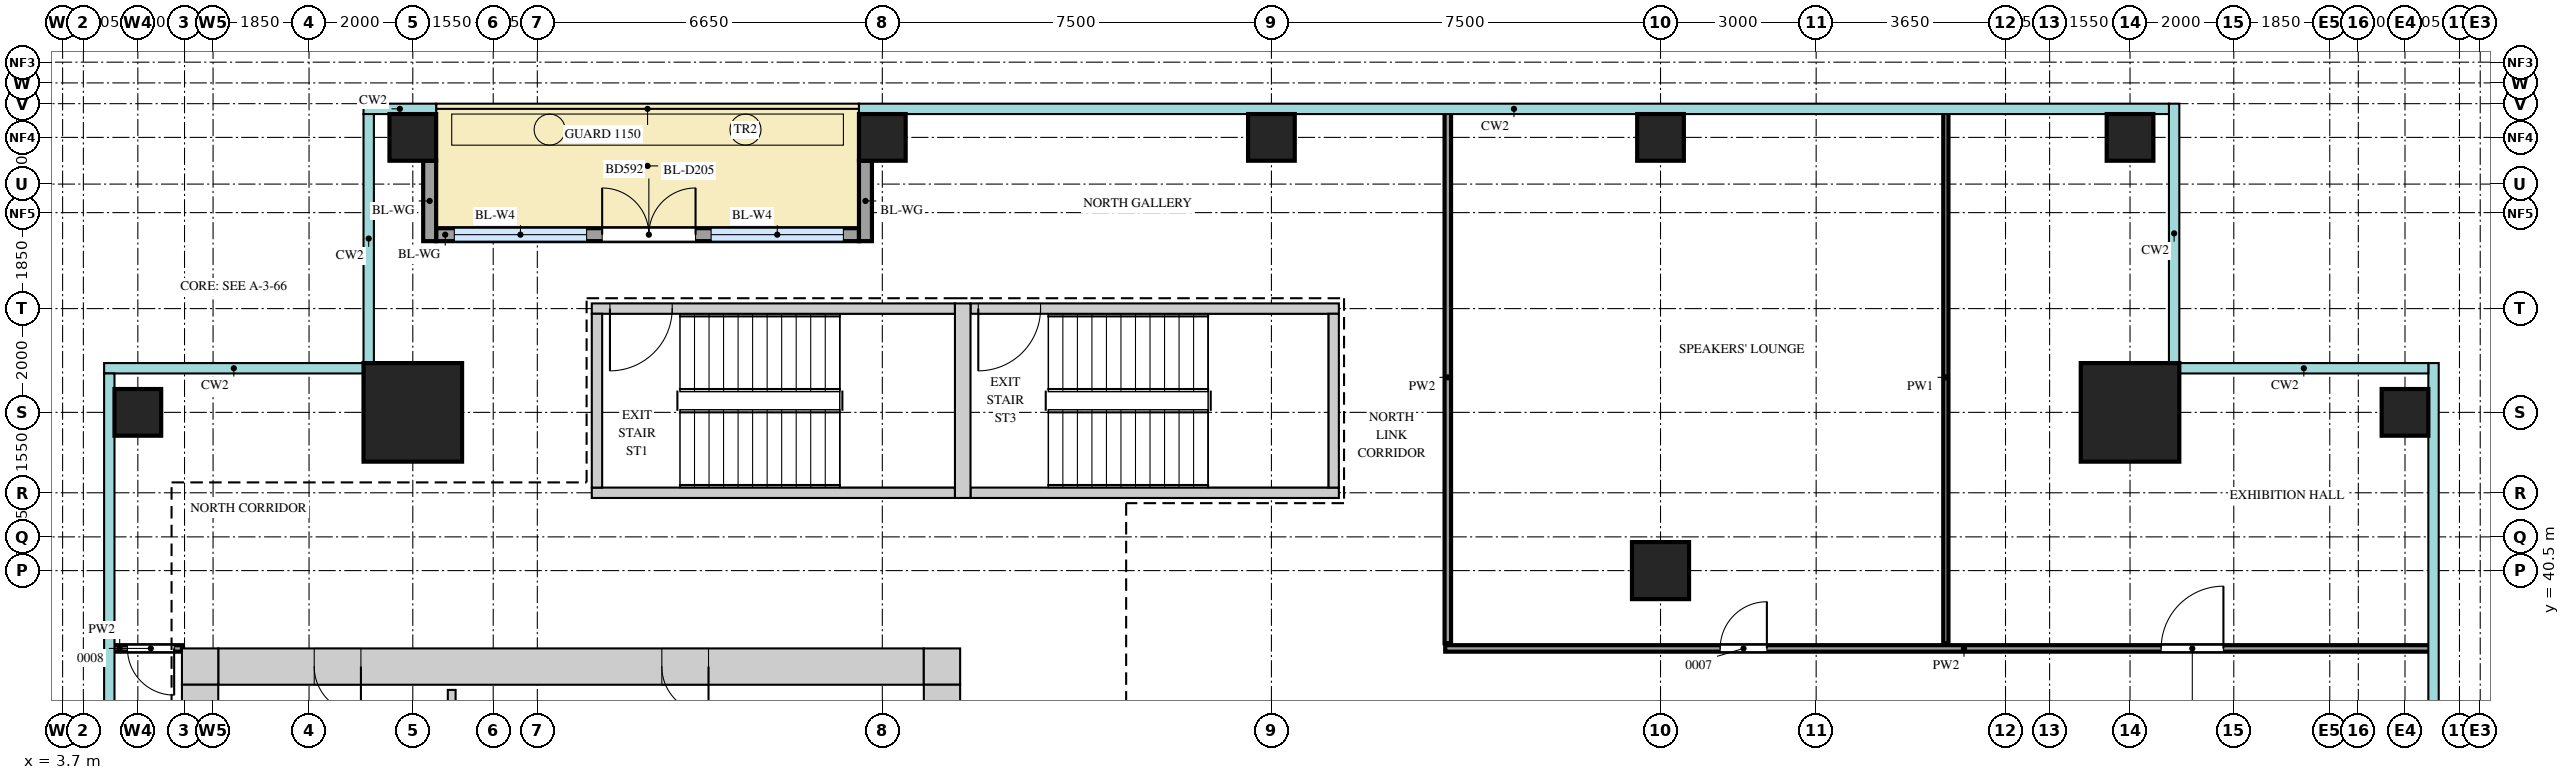
"""IFC4 building model, lengths in metres.
Left out: names, types, materials, properties, quantities, classifications, styles, units other than length and angle.
Written with IfcOpenShell. Run it as: python <this file> out.ifc"""

import sys

from ifc_helpers import new_model, si_unit, direction, frame, frame_2d, origin, origin_2d, place, context, subcontext, project, spatial, rectangle, extrude, source, transform, mapped, element, fill, save


model = new_model("IFC4")
c1 = context("Model", 3, precision=1e-05, world=origin(), true_north=direction((0.0, 1.0)))
c2 = subcontext(c1, "Body", "Model", "MODEL_VIEW")
j1 = project(units=[si_unit("LENGTHUNIT", "METRE"), si_unit("PLANEANGLEUNIT", "RADIAN")], contexts=[c1])
p1 = place(None, origin())
s1 = spatial("IfcSite", under=j1, at=p1, CompositionType="ELEMENT")
p2 = place(p1, origin())
s2 = spatial("IfcBuilding", under=s1, at=p2, CompositionType="ELEMENT")
p3 = place(p2, frame((0.0, 0.0, 262.2)))
s3 = spatial("IfcBuildingStorey", under=s2, at=p3, CompositionType="ELEMENT", Elevation=262.2)
m1 = source(origin(), c2, "Body", "SweptSolid", [
    extrude(rectangle(XDim=13.6, YDim=0.7, at=frame_2d((6.8, 0.0))), origin(), (0.0, 0.0, 1.0), 3.75),
])
p4 = place(p3, frame((6.7, 38.65, 0.0), z_axis=(0.0, 0.0, 1.0), x_axis=(1.0, 0.0, 0.0)))
e1 = element("IfcWall", 1, at=p4, inside=s3, PredefinedType="SHEAR", context=c2, shape_type="MappedRepresentation", body=[
    mapped(m1, transform((0.0, 0.0, 0.0))),
])
m2 = source(origin(), c2, "Body", "SweptSolid", [
    extrude(rectangle(XDim=0.9, YDim=2.1, at=frame_2d((0.45, 1.05))), frame((0.0, 0.36, 0.0), z_axis=(0.0, -1.0, 0.0), x_axis=(1.0, 0.0, 0.0)), (0.0, 0.0, 1.0), 0.72),
])
p5 = place(p4, frame((1.85, 0.0, 0.0)))
e2 = element("IfcOpeningElement", 2, at=p5, cuts=e1, PredefinedType="OPENING", context=c2, shape_type="MappedRepresentation", body=[
    mapped(m2, transform((0.0, 0.0, 0.0))),
])
p6 = place(p4, frame((8.55, 0.0, 0.0)))
e3 = element("IfcOpeningElement", 3, at=p6, cuts=e1, PredefinedType="OPENING", context=c2, shape_type="MappedRepresentation", body=[
    mapped(m2, transform((0.0, 0.0, 0.0))),
])
m3 = source(origin(), c2, "Body", "SweptSolid", [
    extrude(rectangle(XDim=0.7, YDim=0.7, at=frame_2d((0.35, 0.0))), origin(), (0.0, 0.0, 1.0), 3.75),
])
for number, where, z_axis, x_axis in (
    (4, (20.3, 38.65, 0.0), (0.0, 0.0, 1.0), (1.0, 0.0, 0.0)),
    (5, (6.0, 38.65, 0.0), (0.0, 0.0, 1.0), (1.0, 0.0, 0.0)),
):
    element("IfcWall", number, at=place(p3, frame(where, z_axis=z_axis, x_axis=x_axis)), inside=s3, PredefinedType="SHEAR", context=c2, shape_type="MappedRepresentation", body=[
        mapped(m3, transform((0.0, 0.0, 0.0))),
    ])
m4 = source(origin(), c2, "Body", "SweptSolid", [
    extrude(rectangle(XDim=22.6, YDim=0.7, at=frame_2d((11.3, 0.0))), origin(), (0.0, 0.0, 1.0), 3.75),
])
p7 = place(p3, frame((20.65, 15.7, 0.0), z_axis=(0.0, 0.0, 1.0), x_axis=(0.0, 1.0, 0.0)))
e6 = element("IfcWall", 6, at=p7, inside=s3, PredefinedType="SHEAR", context=c2, shape_type="MappedRepresentation", body=[
    mapped(m4, transform((0.0, 0.0, 0.0))),
])
m5 = source(origin(), c2, "Body", "SweptSolid", [
    extrude(rectangle(XDim=1.8, YDim=2.1, at=frame_2d((0.9, 1.05))), frame((0.0, 0.36, 0.0), z_axis=(0.0, -1.0, 0.0), x_axis=(1.0, 0.0, 0.0)), (0.0, 0.0, 1.0), 0.72),
])
p8 = place(p7, frame((10.8, 0.0, 0.0)))
e7 = element("IfcOpeningElement", 7, at=p8, cuts=e6, PredefinedType="OPENING", context=c2, shape_type="MappedRepresentation", body=[
    mapped(m5, transform((0.0, 0.0, 0.0))),
])
p9 = place(p7, frame((0.45, 0.0, 0.0)))
e8 = element("IfcOpeningElement", 8, at=p9, cuts=e6, PredefinedType="OPENING", context=c2, shape_type="MappedRepresentation", body=[
    mapped(m2, transform((0.0, 0.0, 0.0))),
])
p10 = place(p7, frame((2.25, 0.0, 0.0)))
e9 = element("IfcOpeningElement", 9, at=p10, cuts=e6, PredefinedType="OPENING", context=c2, shape_type="MappedRepresentation", body=[
    mapped(m2, transform((0.0, 0.0, 0.0))),
])
m6 = source(origin(), c2, "Body", "SweptSolid", [
    extrude(rectangle(XDim=1.0, YDim=2.1, at=frame_2d((0.5, 1.05))), frame((0.0, 0.36, 0.0), z_axis=(0.0, -1.0, 0.0), x_axis=(1.0, 0.0, 0.0)), (0.0, 0.0, 1.0), 0.72),
])
p11 = place(p7, frame((4.95, 0.0, 0.0)))
e10 = element("IfcOpeningElement", 10, at=p11, cuts=e6, PredefinedType="OPENING", context=c2, shape_type="MappedRepresentation", body=[
    mapped(m6, transform((0.0, 0.0, 0.0))),
])
p12 = place(p3, frame((6.35, 15.7, 0.0), z_axis=(0.0, 0.0, 1.0), x_axis=(0.0, 1.0, 0.0)))
e11 = element("IfcWall", 11, at=p12, inside=s3, PredefinedType="SHEAR", context=c2, shape_type="MappedRepresentation", body=[
    mapped(m4, transform((0.0, 0.0, 0.0))),
])
m7 = source(origin(), c2, "Body", "SweptSolid", [
    extrude(rectangle(XDim=7.0, YDim=0.2, at=frame_2d((3.5, 0.0))), origin(), (0.0, 0.0, 1.0), 3.75),
])
p13 = place(p3, frame((13.9, 45.55, 0.0), z_axis=(0.0, 0.0, 1.0), x_axis=(1.0, 0.0, 0.0)))
e12 = element("IfcWall", 12, at=p13, inside=s3, PredefinedType="SHEAR", context=c2, shape_type="MappedRepresentation", body=[
    mapped(m7, transform((0.0, 0.0, 0.0))),
])
m8 = source(origin(), c2, "Body", "SweptSolid", [
    extrude(rectangle(XDim=1.2, YDim=2.1, at=frame_2d((0.6, 1.05))), frame((0.0, 0.11, 0.0), z_axis=(0.0, -1.0, 0.0), x_axis=(1.0, 0.0, 0.0)), (0.0, 0.0, 1.0), 0.22),
])
p14 = place(p13, frame((0.35, 0.0, 0.0)))
e13 = element("IfcOpeningElement", 13, at=p14, cuts=e12, PredefinedType="OPENING", context=c2, shape_type="MappedRepresentation", body=[
    mapped(m8, transform((0.0, 0.0, 0.0))),
])
p15 = place(p3, frame((13.9, 42.0, 0.0), z_axis=(0.0, 0.0, 1.0), x_axis=(1.0, 0.0, 0.0)))
e14 = element("IfcWall", 14, at=p15, inside=s3, PredefinedType="SHEAR", context=c2, shape_type="MappedRepresentation", body=[
    mapped(m7, transform((0.0, 0.0, 0.0))),
])
m9 = source(origin(), c2, "Body", "SweptSolid", [
    extrude(rectangle(XDim=7.1, YDim=0.2, at=frame_2d((3.55, 0.0))), origin(), (0.0, 0.0, 1.0), 3.75),
])
p16 = place(p3, frame((21.2, 45.55, 0.0), z_axis=(0.0, 0.0, 1.0), x_axis=(1.0, 0.0, 0.0)))
e15 = element("IfcWall", 15, at=p16, inside=s3, PredefinedType="SHEAR", context=c2, shape_type="MappedRepresentation", body=[
    mapped(m9, transform((0.0, 0.0, 0.0))),
])
p17 = place(p16, frame((0.15, 0.0, 0.0)))
e16 = element("IfcOpeningElement", 16, at=p17, cuts=e15, PredefinedType="OPENING", context=c2, shape_type="MappedRepresentation", body=[
    mapped(m8, transform((0.0, 0.0, 0.0))),
])
p18 = place(p3, frame((21.2, 42.0, 0.0), z_axis=(0.0, 0.0, 1.0), x_axis=(1.0, 0.0, 0.0)))
e17 = element("IfcWall", 17, at=p18, inside=s3, PredefinedType="SHEAR", context=c2, shape_type="MappedRepresentation", body=[
    mapped(m9, transform((0.0, 0.0, 0.0))),
])
m10 = source(origin(), c2, "Body", "SweptSolid", [
    extrude(rectangle(XDim=3.75, YDim=0.3, at=frame_2d((1.875, 0.0))), origin(), (0.0, 0.0, 1.0), 3.75),
])
p19 = place(p3, frame((21.05, 41.9, 0.0), z_axis=(0.0, 0.0, 1.0), x_axis=(0.0, 1.0, 0.0)))
e18 = element("IfcWall", 18, at=p19, inside=s3, PredefinedType="SHEAR", context=c2, shape_type="MappedRepresentation", body=[
    mapped(m10, transform((0.0, 0.0, 0.0))),
])
m11 = source(origin(), c2, "Body", "SweptSolid", [
    extrude(rectangle(XDim=3.35, YDim=0.2, at=frame_2d((1.675, 0.0))), origin(), (0.0, 0.0, 1.0), 3.75),
])
for number, where, z_axis, x_axis in (
    (19, (14.0, 42.1, 0.0), (0.0, 0.0, 1.0), (0.0, 1.0, 0.0)),
    (20, (28.2, 42.1, 0.0), (0.0, 0.0, 1.0), (0.0, 1.0, 0.0)),
):
    element("IfcWall", number, at=place(p3, frame(where, z_axis=z_axis, x_axis=x_axis)), inside=s3, PredefinedType="SHEAR", context=c2, shape_type="MappedRepresentation", body=[
        mapped(m11, transform((0.0, 0.0, 0.0))),
    ])
m12 = source(origin(), c2, "Body", "SweptSolid", [
    extrude(rectangle(XDim=1.9, YDim=1.9, at=origin_2d()), origin(), (0.0, 0.0, 1.0), 4.0),
])
for number, where, z_axis, x_axis in (
    (21, (43.55, 43.55, 0.0), (0.0, 0.0, 1.0), (1.0, 0.0, 0.0)),
    (22, (10.45, 43.55, 0.0), (0.0, 0.0, 1.0), (1.0, 0.0, 0.0)),
):
    element("IfcColumn", number, at=place(p3, frame(where, z_axis=z_axis, x_axis=x_axis)), inside=s3, PredefinedType="COLUMN", context=c2, shape_type="MappedRepresentation", body=[
        mapped(m12, transform((0.0, 0.0, 0.0))),
    ])
m13 = source(origin(), c2, "Body", "SweptSolid", [
    extrude(rectangle(XDim=0.9, YDim=0.9, at=origin_2d()), origin(), (0.0, 0.0, 1.0), 3.75),
])
for number, where, z_axis, x_axis in (
    (23, (48.85, 43.55, 0.0), (0.0, 0.0, 1.0), (1.0, 0.0, 0.0)),
    (24, (10.45, 48.85, 0.0), (0.0, 0.0, 1.0), (1.0, 0.0, 0.0)),
    (25, (19.5, 48.85, 0.0), (0.0, 0.0, 1.0), (1.0, 0.0, 0.0)),
    (26, (27.0, 48.85, 0.0), (0.0, 0.0, 1.0), (1.0, 0.0, 0.0)),
    (27, (34.5, 48.85, 0.0), (0.0, 0.0, 1.0), (1.0, 0.0, 0.0)),
    (28, (43.55, 48.85, 0.0), (0.0, 0.0, 1.0), (1.0, 0.0, 0.0)),
    (29, (5.15, 43.55, 0.0), (0.0, 0.0, 1.0), (1.0, 0.0, 0.0)),
):
    element("IfcColumn", number, at=place(p3, frame(where, z_axis=z_axis, x_axis=x_axis)), inside=s3, PredefinedType="COLUMN", context=c2, shape_type="MappedRepresentation", body=[
        mapped(m13, transform((0.0, 0.0, 0.0))),
    ])
m14 = source(origin(), c2, "Body", "SweptSolid", [
    extrude(rectangle(XDim=1.1, YDim=1.1, at=origin_2d()), origin(), (0.0, 0.0, 1.0), 3.75),
])
p20 = place(p3, frame((34.5, 40.5, 0.0), z_axis=(0.0, 0.0, 1.0), x_axis=(1.0, 0.0, 0.0)))
e30 = element("IfcColumn", 30, at=p20, inside=s3, PredefinedType="COLUMN", context=c2, shape_type="MappedRepresentation", body=[
    mapped(m14, transform((0.0, 0.0, 0.0))),
])
m15 = source(origin(), c2, "Body", "SweptSolid", [
    extrude(rectangle(XDim=8.15, YDim=0.25, at=frame_2d((4.075, 0.0))), origin(), (0.0, 0.0, 1.0), 3.35),
])
p21 = place(p3, frame((10.9, 46.975, 0.0), z_axis=(0.0, 0.0, 1.0), x_axis=(1.0, 0.0, 0.0)))
e31 = element("IfcWall", 31, at=p21, inside=s3, PredefinedType="SOLIDWALL", context=c2, shape_type="MappedRepresentation", body=[
    mapped(m15, transform((0.0, 0.0, 0.0))),
])
m16 = source(origin(), c2, "Body", "SweptSolid", [
    extrude(rectangle(XDim=2.55, YDim=2.4, at=frame_2d((1.275, 1.2))), frame((0.0, 0.135, 0.0), z_axis=(0.0, -1.0, 0.0), x_axis=(1.0, 0.0, 0.0)), (0.0, 0.0, 1.0), 0.27),
])
p22 = place(p21, frame((0.35, 0.0, 0.0)))
e32 = element("IfcOpeningElement", 32, at=p22, cuts=e31, PredefinedType="OPENING", context=c2, shape_type="MappedRepresentation", body=[
    mapped(m16, transform((0.0, 0.0, 0.0))),
])
p23 = place(p21, frame((5.3, 0.0, 0.0)))
e33 = element("IfcOpeningElement", 33, at=p23, cuts=e31, PredefinedType="OPENING", context=c2, shape_type="MappedRepresentation", body=[
    mapped(m16, transform((0.0, 0.0, 0.0))),
])
m17 = source(origin(), c2, "Body", "SweptSolid", [
    extrude(rectangle(XDim=1.8, YDim=2.4, at=frame_2d((0.9, 1.2))), frame((0.0, 0.135, 0.0), z_axis=(0.0, -1.0, 0.0), x_axis=(1.0, 0.0, 0.0)), (0.0, 0.0, 1.0), 0.27),
])
p24 = place(p21, frame((3.2, 0.0, 0.0)))
e34 = element("IfcOpeningElement", 34, at=p24, cuts=e31, PredefinedType="OPENING", context=c2, shape_type="MappedRepresentation", body=[
    mapped(m17, transform((0.0, 0.0, 0.0))),
])
m18 = source(origin(), c2, "Body", "SweptSolid", [
    extrude(rectangle(XDim=1.55, YDim=0.25, at=frame_2d((0.775, 0.0))), origin(), (0.0, 0.0, 1.0), 3.35),
])
for number, where, z_axis, x_axis in (
    (35, (10.775, 48.4, 0.0), (0.0, 0.0, 1.0), (0.0, -1.0, 0.0)),
    (36, (19.175, 48.4, 0.0), (0.0, 0.0, 1.0), (0.0, -1.0, 0.0)),
):
    element("IfcWall", number, at=place(p3, frame(where, z_axis=z_axis, x_axis=x_axis)), inside=s3, PredefinedType="SOLIDWALL", context=c2, shape_type="MappedRepresentation", body=[
        mapped(m18, transform((0.0, 0.0, 0.0))),
    ])
m19 = source(origin(), c2, "Body", "SweptSolid", [
    extrude(rectangle(XDim=6.0, YDim=0.15, at=frame_2d((3.0, 0.0))), origin(), (0.0, 0.0, 1.0), 3.8),
])
p25 = place(p3, frame((11.2, 32.2, 0.0), z_axis=(0.0, 0.0, 1.0), x_axis=(0.0, 1.0, 0.0)))
e37 = element("IfcWall", 37, at=p25, inside=s3, PredefinedType="PARTITIONING", context=c2, shape_type="MappedRepresentation", body=[
    mapped(m19, transform((0.0, 0.0, 0.0))),
])
m20 = source(origin(), c2, "Body", "SweptSolid", [
    extrude(rectangle(XDim=1.35, YDim=0.125, at=frame_2d((0.675, 0.0))), origin(), (0.0, 0.0, 1.0), 3.8),
])
p26 = place(p3, frame((4.65, 39.0, 0.0), z_axis=(0.0, 0.0, 1.0), x_axis=(1.0, 0.0, 0.0)))
e38 = element("IfcWall", 38, at=p26, inside=s3, PredefinedType="PARTITIONING", context=c2, shape_type="MappedRepresentation", body=[
    mapped(m20, transform((0.0, 0.0, 0.0))),
])
m21 = source(origin(), c2, "Body", "SweptSolid", [
    extrude(rectangle(XDim=0.9, YDim=2.1, at=frame_2d((0.45, 1.05))), frame((0.0, 0.073, 0.0), z_axis=(0.0, -1.0, 0.0), x_axis=(1.0, 0.0, 0.0)), (0.0, 0.0, 1.0), 0.145),
])
p27 = place(p26, frame((0.3, 0.0, 0.0)))
e39 = element("IfcOpeningElement", 39, at=p27, cuts=e38, PredefinedType="OPENING", context=c2, shape_type="MappedRepresentation", body=[
    mapped(m21, transform((0.0, 0.0, 0.0))),
])
m22 = source(origin(), c2, "Body", "SweptSolid", [
    extrude(rectangle(XDim=19.0, YDim=0.125, at=frame_2d((9.5, 0.0))), origin(), (0.0, 0.0, 1.0), 3.8),
])
p28 = place(p3, frame((30.35, 39.0, 0.0), z_axis=(0.0, 0.0, 1.0), x_axis=(1.0, 0.0, 0.0)))
e40 = element("IfcWall", 40, at=p28, inside=s3, PredefinedType="PARTITIONING", context=c2, shape_type="MappedRepresentation", body=[
    mapped(m22, transform((0.0, 0.0, 0.0))),
])
p29 = place(p28, frame((5.3, 0.0, 0.0)))
e41 = element("IfcOpeningElement", 41, at=p29, cuts=e40, PredefinedType="OPENING", context=c2, shape_type="MappedRepresentation", body=[
    mapped(m21, transform((0.0, 0.0, 0.0))),
])
m23 = source(origin(), c2, "Body", "SweptSolid", [
    extrude(rectangle(XDim=1.2, YDim=2.1, at=frame_2d((0.6, 1.05))), frame((0.0, 0.073, 0.0), z_axis=(0.0, -1.0, 0.0), x_axis=(1.0, 0.0, 0.0)), (0.0, 0.0, 1.0), 0.145),
])
p30 = place(p28, frame((13.8, 0.0, 0.0)))
e42 = element("IfcOpeningElement", 42, at=p30, cuts=e40, PredefinedType="OPENING", context=c2, shape_type="MappedRepresentation", body=[
    mapped(m23, transform((0.0, 0.0, 0.0))),
])
m24 = source(origin(), c2, "Body", "SweptSolid", [
    extrude(rectangle(XDim=10.25, YDim=0.125, at=frame_2d((5.125, 0.0))), origin(), (0.0, 0.0, 1.0), 3.8),
])
p31 = place(p3, frame((30.4, 39.1, 0.0), z_axis=(0.0, 0.0, 1.0), x_axis=(0.0, 1.0, 0.0)))
e43 = element("IfcWall", 43, at=p31, inside=s3, PredefinedType="PARTITIONING", context=c2, shape_type="MappedRepresentation", body=[
    mapped(m24, transform((0.0, 0.0, 0.0))),
])
m25 = source(origin(), c2, "Body", "SweptSolid", [
    extrude(rectangle(XDim=10.25, YDim=0.1, at=frame_2d((5.125, 0.0))), origin(), (0.0, 0.0, 1.0), 3.8),
])
p32 = place(p3, frame((40.0, 39.1, 0.0), z_axis=(0.0, 0.0, 1.0), x_axis=(0.0, 1.0, 0.0)))
e44 = element("IfcWall", 44, at=p32, inside=s3, PredefinedType="PARTITIONING", context=c2, shape_type="MappedRepresentation", body=[
    mapped(m25, transform((0.0, 0.0, 0.0))),
])
m26 = source(origin(), c2, "Body", "SweptSolid", [
    extrude(rectangle(XDim=2.55, YDim=2.4, at=frame_2d((1.275, 1.2))), frame((0.0, 0.03, 0.0), z_axis=(0.0, -1.0, 0.0), x_axis=(1.0, 0.0, 0.0)), (0.0, 0.0, 1.0), 0.06),
])
p33 = place(p22, origin())
e45 = element("IfcWindow", 45, at=p33, inside=s3, PartitioningType="SINGLE_PANEL", PredefinedType="WINDOW", context=c2, shape_type="MappedRepresentation", body=[
    mapped(m26, transform((0.0, 0.0, 0.0))),
])
fill(e32, e45)
p34 = place(p23, origin())
e46 = element("IfcWindow", 46, at=p34, inside=s3, PartitioningType="SINGLE_PANEL", PredefinedType="WINDOW", context=c2, shape_type="MappedRepresentation", body=[
    mapped(m26, transform((0.0, 0.0, 0.0))),
])
fill(e33, e46)
m27 = source(origin(), c2, "Body", "SweptSolid", [
    extrude(rectangle(XDim=1.8, YDim=2.4, at=frame_2d((0.9, 1.2))), frame((0.0, 0.025, 0.0), z_axis=(0.0, -1.0, 0.0), x_axis=(1.0, 0.0, 0.0)), (0.0, 0.0, 1.0), 0.05),
])
p35 = place(p24, origin())
e47 = element("IfcDoor", 47, at=p35, inside=s3, OperationType="DOUBLE_DOOR_DOUBLE_SWING", PredefinedType="DOOR", context=c2, shape_type="MappedRepresentation", body=[
    mapped(m27, transform((0.0, 0.0, 0.0))),
])
fill(e34, e47)
m28 = source(origin(), c2, "Body", "SweptSolid", [
    extrude(rectangle(XDim=0.9, YDim=2.1, at=frame_2d((0.45, 1.05))), frame((0.0, 0.3, 0.0), z_axis=(0.0, -1.0, 0.0), x_axis=(1.0, 0.0, 0.0)), (0.0, 0.0, 1.0), 0.6),
])
p36 = place(p5, origin())
e48 = element("IfcDoor", 48, at=p36, inside=s3, OperationType="SINGLE_SWING_RIGHT", PredefinedType="DOOR", context=c2, shape_type="MappedRepresentation", body=[
    mapped(m28, transform((0.0, 0.0, 0.0))),
])
fill(e2, e48)
p37 = place(p6, origin())
e49 = element("IfcDoor", 49, at=p37, inside=s3, OperationType="SINGLE_SWING_RIGHT", PredefinedType="DOOR", context=c2, shape_type="MappedRepresentation", body=[
    mapped(m28, transform((0.0, 0.0, 0.0))),
])
fill(e3, e49)
m29 = source(origin(), c2, "Body", "SweptSolid", [
    extrude(rectangle(XDim=0.9, YDim=2.1, at=frame_2d((0.45, 1.05))), frame((0.0, 0.025, 0.0), z_axis=(0.0, -1.0, 0.0), x_axis=(1.0, 0.0, 0.0)), (0.0, 0.0, 1.0), 0.05),
])
p38 = place(p27, origin())
e50 = element("IfcDoor", 50, at=p38, inside=s3, OperationType="SINGLE_SWING_RIGHT", PredefinedType="DOOR", context=c2, shape_type="MappedRepresentation", body=[
    mapped(m29, transform((0.0, 0.0, 0.0))),
])
fill(e39, e50)
p39 = place(p29, origin())
e51 = element("IfcDoor", 51, at=p39, inside=s3, OperationType="SINGLE_SWING_LEFT", PredefinedType="DOOR", context=c2, shape_type="MappedRepresentation", body=[
    mapped(m29, transform((0.0, 0.0, 0.0))),
])
fill(e41, e51)
m30 = source(origin(), c2, "Body", "SweptSolid", [
    extrude(rectangle(XDim=1.2, YDim=2.1, at=frame_2d((0.6, 1.05))), frame((0.0, 0.025, 0.0), z_axis=(0.0, -1.0, 0.0), x_axis=(1.0, 0.0, 0.0)), (0.0, 0.0, 1.0), 0.05),
])
p40 = place(p30, origin())
e52 = element("IfcDoor", 52, at=p40, inside=s3, OperationType="SINGLE_SWING_LEFT", PredefinedType="DOOR", context=c2, shape_type="MappedRepresentation", body=[
    mapped(m30, transform((0.0, 0.0, 0.0))),
])
fill(e42, e52)
p41 = place(p14, origin())
e53 = element("IfcDoor", 53, at=p41, inside=s3, OperationType="SINGLE_SWING_LEFT", PredefinedType="DOOR", context=c2, shape_type="MappedRepresentation", body=[
    mapped(m30, transform((0.0, 0.0, 0.0))),
])
fill(e13, e53)
p42 = place(p17, origin())
e54 = element("IfcDoor", 54, at=p42, inside=s3, OperationType="SINGLE_SWING_LEFT", PredefinedType="DOOR", context=c2, shape_type="MappedRepresentation", body=[
    mapped(m30, transform((0.0, 0.0, 0.0))),
])
fill(e16, e54)
save(model, sys.argv[1])
